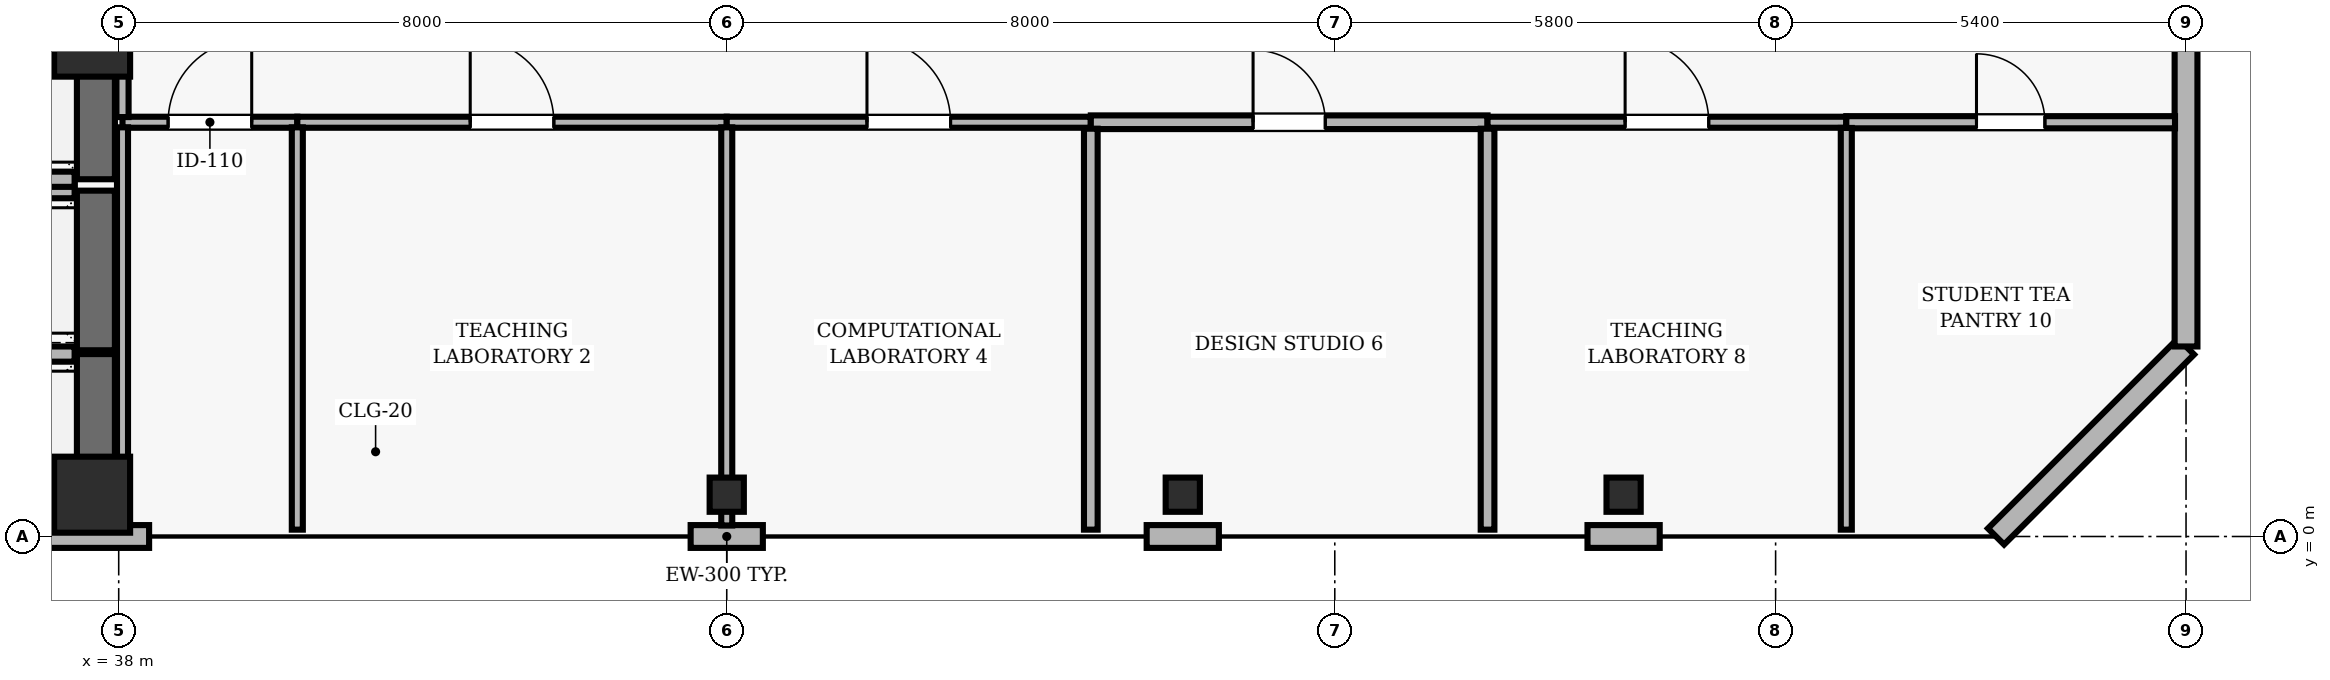
"""IFC4 building model, lengths in metres.
Left out: names, types, materials, properties, quantities, classifications, styles, units other than length and angle.
Written with IfcOpenShell. Run it as: python <this file> out.ifc"""

import sys

from ifc_helpers import new_model, si_unit, direction, frame, frame_2d, origin, origin_2d, place, context, subcontext, project, spatial, rectangle, hollow_rectangle, extrude, element, fill, save


model = new_model("IFC4")
c1 = context("Model", 3, precision=1e-05, world=origin(), true_north=direction((0.0, 1.0)))
c2 = subcontext(c1, "Body", "Model", "MODEL_VIEW")
j1 = project(units=[si_unit("LENGTHUNIT", "METRE"), si_unit("PLANEANGLEUNIT", "RADIAN")], contexts=[c1])
p1 = place(None, origin())
s1 = spatial("IfcSite", under=j1, at=p1, CompositionType="ELEMENT")
p2 = place(p1, origin())
s2 = spatial("IfcBuilding", under=s1, at=p2, CompositionType="ELEMENT")
p3 = place(p2, frame((0.0, 0.0, 207.0)))
s3 = spatial("IfcBuildingStorey", under=s2, at=p3, CompositionType="ELEMENT", Elevation=207.0)
for number, where, z_axis, x_axis in (
    (1, (37.65, 0.55, 0.0), (0.0, 0.0, 1.0), (1.0, 0.0, 0.0)),
    (2, (37.65, 6.55, 0.0), (0.0, 0.0, 1.0), (1.0, 0.0, 0.0)),
):
    element("IfcColumn", number, at=place(p3, frame(where, z_axis=z_axis, x_axis=x_axis)), inside=s3, PredefinedType="COLUMN", context=c2, shape_type="SweptSolid", body=[
        extrude(rectangle(XDim=1.0, YDim=1.0, at=origin_2d()), origin(), (0.0, 0.0, 1.0), 3.9),
    ])
for number, where, z_axis, x_axis in (
    (3, (46.0, 0.55, 0.0), (0.0, 0.0, 1.0), (1.0, 0.0, 0.0)),
    (4, (52.0, 0.55, 0.0), (0.0, 0.0, 1.0), (1.0, 0.0, 0.0)),
    (5, (57.8, 0.55, 0.0), (0.0, 0.0, 1.0), (1.0, 0.0, 0.0)),
):
    element("IfcColumn", number, at=place(p3, frame(where, z_axis=z_axis, x_axis=x_axis)), inside=s3, PredefinedType="COLUMN", context=c2, shape_type="SweptSolid", body=[
        extrude(hollow_rectangle(XDim=0.45, YDim=0.45, WallThickness=0.02, at=origin_2d()), origin(), (0.0, 0.0, 1.0), 3.9),
    ])
p4 = place(p3, frame((31.0, 0.0, 0.0), z_axis=(0.0, 0.0, 1.0), x_axis=(1.0, 0.0, 0.0)))
e6 = element("IfcWall", 6, at=p4, inside=s3, PredefinedType="SOLIDWALL", context=c2, shape_type="SweptSolid", body=[
    extrude(rectangle(XDim=7.4, YDim=0.3, at=frame_2d((3.7, 0.0))), origin(), (0.0, 0.0, 1.0), 3.69),
])
for number, where, z_axis, x_axis in (
    (7, (45.525, 0.0, 0.0), (0.0, 0.0, 1.0), (1.0, 0.0, 0.0)),
    (8, (51.525, 0.0, 0.0), (0.0, 0.0, 1.0), (1.0, 0.0, 0.0)),
):
    element("IfcWall", number, at=place(p3, frame(where, z_axis=z_axis, x_axis=x_axis)), inside=s3, PredefinedType="SOLIDWALL", context=c2, shape_type="SweptSolid", body=[
        extrude(rectangle(XDim=0.95, YDim=0.3, at=frame_2d((0.475, 0.0))), origin(), (0.0, 0.0, 1.0), 3.69),
    ])
p5 = place(p3, frame((57.325, 0.0, 0.0), z_axis=(0.0, 0.0, 1.0), x_axis=(1.0, 0.0, 0.0)))
e9 = element("IfcWall", 9, at=p5, inside=s3, PredefinedType="SOLIDWALL", context=c2, shape_type="SweptSolid", body=[
    extrude(rectangle(XDim=0.95, YDim=0.3, at=frame_2d((0.475, 0.0))), origin(), (0.0, 0.0, 1.0), 3.69),
])
p6 = place(p3, frame((62.7, 0.0, 0.0), z_axis=(0.0, 0.0, 1.0), x_axis=(0.707106781187, 0.707106781187, 0.0)))
e10 = element("IfcWall", 10, at=p6, inside=s3, PredefinedType="SOLIDWALL", context=c2, shape_type="SweptSolid", body=[
    extrude(rectangle(XDim=3.536, YDim=0.3, at=frame_2d((1.768, 0.0))), origin(), (0.0, 0.0, 1.0), 3.69),
])
p7 = place(p3, frame((65.2, 2.5, 0.0), z_axis=(0.0, 0.0, 1.0), x_axis=(0.0, 1.0, 0.0)))
e11 = element("IfcWall", 11, at=p7, inside=s3, PredefinedType="SOLIDWALL", context=c2, shape_type="SweptSolid", body=[
    extrude(rectangle(XDim=11.0, YDim=0.3, at=frame_2d((5.5, 0.0))), origin(), (0.0, 0.0, 1.0), 3.69),
])
p8 = place(p7, frame((7.05, 0.0, 0.9)))
e12 = element("IfcOpeningElement", 12, at=p8, cuts=e11, PredefinedType="OPENING", context=c2, shape_type="SweptSolid", body=[
    extrude(rectangle(XDim=2.4, YDim=1.6, at=frame_2d((1.2, 0.8))), frame((0.0, 0.16, 0.0), z_axis=(0.0, -1.0, 0.0), x_axis=(1.0, 0.0, 0.0)), (0.0, 0.0, 1.0), 0.32),
])
p9 = place(p3, frame((37.7, 0.3, 0.0), z_axis=(0.0, 0.0, 1.0), x_axis=(0.0, 1.0, 0.0)))
e13 = element("IfcWall", 13, at=p9, inside=s3, PredefinedType="SHEAR", context=c2, shape_type="SweptSolid", body=[
    extrude(rectangle(XDim=2.1, YDim=0.5, at=frame_2d((1.05, 0.0))), origin(), (0.0, 0.0, 1.0), 3.69),
])
for number, where, z_axis, x_axis in (
    (14, (35.28, 0.3, 0.0), (0.0, 0.0, 1.0), (1.0, 0.0, 0.0)),
    (15, (37.42, 2.4, 0.0), (0.0, 0.0, 1.0), (-1.0, 0.0, 0.0)),
):
    element("IfcWall", number, at=place(p3, frame(where, z_axis=z_axis, x_axis=x_axis)), inside=s3, PredefinedType="SOLIDWALL", context=c2, shape_type="SweptSolid", body=[
        extrude(rectangle(XDim=2.14, YDim=0.2, at=frame_2d((1.07, 0.0))), origin(), (0.0, 0.0, 1.0), 3.69),
    ])
p10 = place(p3, frame((37.7, 2.45, 0.0), z_axis=(0.0, 0.0, 1.0), x_axis=(0.0, 1.0, 0.0)))
e16 = element("IfcWall", 16, at=p10, inside=s3, PredefinedType="SHEAR", context=c2, shape_type="SweptSolid", body=[
    extrude(rectangle(XDim=2.1, YDim=0.5, at=frame_2d((1.05, 0.0))), origin(), (0.0, 0.0, 1.0), 3.69),
])
p11 = place(p3, frame((37.42, 4.55, 0.0), z_axis=(0.0, 0.0, 1.0), x_axis=(-1.0, 0.0, 0.0)))
e17 = element("IfcWall", 17, at=p11, inside=s3, PredefinedType="SOLIDWALL", context=c2, shape_type="SweptSolid", body=[
    extrude(rectangle(XDim=2.14, YDim=0.2, at=frame_2d((1.07, 0.0))), origin(), (0.0, 0.0, 1.0), 3.69),
])
p12 = place(p3, frame((37.7, 4.7, 0.0), z_axis=(0.0, 0.0, 1.0), x_axis=(0.0, 1.0, 0.0)))
e18 = element("IfcWall", 18, at=p12, inside=s3, PredefinedType="SHEAR", context=c2, shape_type="SweptSolid", body=[
    extrude(rectangle(XDim=2.25, YDim=0.5, at=frame_2d((1.125, 0.0))), origin(), (0.0, 0.0, 1.0), 3.69),
])
p13 = place(p3, frame((35.28, 4.7, 0.0), z_axis=(0.0, 0.0, 1.0), x_axis=(1.0, 0.0, 0.0)))
e19 = element("IfcWall", 19, at=p13, inside=s3, PredefinedType="SOLIDWALL", context=c2, shape_type="SweptSolid", body=[
    extrude(rectangle(XDim=2.14, YDim=0.2, at=frame_2d((1.07, 0.0))), origin(), (0.0, 0.0, 1.0), 3.69),
])
p14 = place(p3, frame((38.05, 5.45, 0.0), z_axis=(0.0, 0.0, 1.0), x_axis=(1.0, 0.0, 0.0)))
e20 = element("IfcWall", 20, at=p14, inside=s3, PredefinedType="PARTITIONING", context=c2, shape_type="SweptSolid", body=[
    extrude(rectangle(XDim=2.3, YDim=0.145, at=frame_2d((1.15, 0.0))), origin(), (0.0, 0.0, 1.0), 3.343),
])
p15 = place(p14, frame((0.6, 0.0, 0.0)))
e21 = element("IfcOpeningElement", 21, at=p15, cuts=e20, PredefinedType="OPENING", context=c2, shape_type="SweptSolid", body=[
    extrude(rectangle(XDim=1.1, YDim=2.15, at=frame_2d((0.55, 1.075))), frame((0.0, 0.083, 0.0), z_axis=(0.0, -1.0, 0.0), x_axis=(1.0, 0.0, 0.0)), (0.0, 0.0, 1.0), 0.165),
])
p16 = place(p3, frame((40.35, 5.45, 0.0), z_axis=(0.0, 0.0, 1.0), x_axis=(1.0, 0.0, 0.0)))
e22 = element("IfcWall", 22, at=p16, inside=s3, PredefinedType="PARTITIONING", context=c2, shape_type="SweptSolid", body=[
    extrude(rectangle(XDim=5.65, YDim=0.145, at=frame_2d((2.825, 0.0))), origin(), (0.0, 0.0, 1.0), 3.343),
])
p17 = place(p16, frame((2.275, 0.0, 0.0)))
e23 = element("IfcOpeningElement", 23, at=p17, cuts=e22, PredefinedType="OPENING", context=c2, shape_type="SweptSolid", body=[
    extrude(rectangle(XDim=1.1, YDim=2.15, at=frame_2d((0.55, 1.075))), frame((0.0, 0.083, 0.0), z_axis=(0.0, -1.0, 0.0), x_axis=(1.0, 0.0, 0.0)), (0.0, 0.0, 1.0), 0.165),
])
p18 = place(p3, frame((46.0, 5.45, 0.0), z_axis=(0.0, 0.0, 1.0), x_axis=(1.0, 0.0, 0.0)))
e24 = element("IfcWall", 24, at=p18, inside=s3, PredefinedType="PARTITIONING", context=c2, shape_type="SweptSolid", body=[
    extrude(rectangle(XDim=4.79, YDim=0.145, at=frame_2d((2.395, 0.0))), origin(), (0.0, 0.0, 1.0), 3.343),
])
p19 = place(p18, frame((1.845, 0.0, 0.0)))
e25 = element("IfcOpeningElement", 25, at=p19, cuts=e24, PredefinedType="OPENING", context=c2, shape_type="SweptSolid", body=[
    extrude(rectangle(XDim=1.1, YDim=2.15, at=frame_2d((0.55, 1.075))), frame((0.0, 0.083, 0.0), z_axis=(0.0, -1.0, 0.0), x_axis=(1.0, 0.0, 0.0)), (0.0, 0.0, 1.0), 0.165),
])
p20 = place(p3, frame((50.79, 5.45, 0.0), z_axis=(0.0, 0.0, 1.0), x_axis=(1.0, 0.0, 0.0)))
e26 = element("IfcWall", 26, at=p20, inside=s3, PredefinedType="PARTITIONING", context=c2, shape_type="SweptSolid", body=[
    extrude(rectangle(XDim=5.22, YDim=0.18, at=frame_2d((2.61, 0.0))), origin(), (0.0, 0.0, 1.0), 3.343),
])
p21 = place(p20, frame((2.135, 0.0, 0.0)))
e27 = element("IfcOpeningElement", 27, at=p21, cuts=e26, PredefinedType="OPENING", context=c2, shape_type="SweptSolid", body=[
    extrude(rectangle(XDim=0.95, YDim=2.1, at=frame_2d((0.475, 1.05))), frame((0.0, 0.1, 0.0), z_axis=(0.0, -1.0, 0.0), x_axis=(1.0, 0.0, 0.0)), (0.0, 0.0, 1.0), 0.2),
])
p22 = place(p3, frame((56.01, 5.45, 0.0), z_axis=(0.0, 0.0, 1.0), x_axis=(1.0, 0.0, 0.0)))
e28 = element("IfcWall", 28, at=p22, inside=s3, PredefinedType="PARTITIONING", context=c2, shape_type="SweptSolid", body=[
    extrude(rectangle(XDim=4.72, YDim=0.145, at=frame_2d((2.36, 0.0))), origin(), (0.0, 0.0, 1.0), 3.343),
])
p23 = place(p22, frame((1.81, 0.0, 0.0)))
e29 = element("IfcOpeningElement", 29, at=p23, cuts=e28, PredefinedType="OPENING", context=c2, shape_type="SweptSolid", body=[
    extrude(rectangle(XDim=1.1, YDim=2.15, at=frame_2d((0.55, 1.075))), frame((0.0, 0.083, 0.0), z_axis=(0.0, -1.0, 0.0), x_axis=(1.0, 0.0, 0.0)), (0.0, 0.0, 1.0), 0.165),
])
p24 = place(p3, frame((60.73, 5.45, 0.0), z_axis=(0.0, 0.0, 1.0), x_axis=(1.0, 0.0, 0.0)))
e30 = element("IfcWall", 30, at=p24, inside=s3, PredefinedType="PARTITIONING", context=c2, shape_type="SweptSolid", body=[
    extrude(rectangle(XDim=4.325, YDim=0.16, at=frame_2d((2.163, 0.0))), origin(), (0.0, 0.0, 1.0), 3.69),
])
p25 = place(p24, frame((1.713, 0.0, 0.0)))
e31 = element("IfcOpeningElement", 31, at=p25, cuts=e30, PredefinedType="OPENING", context=c2, shape_type="SweptSolid", body=[
    extrude(rectangle(XDim=0.9, YDim=2.1, at=frame_2d((0.45, 1.05))), frame((0.0, 0.09, 0.0), z_axis=(0.0, -1.0, 0.0), x_axis=(1.0, 0.0, 0.0)), (0.0, 0.0, 1.0), 0.18),
])
p26 = place(p3, frame((38.05, 5.383, 0.0), z_axis=(0.0, 0.0, 1.0), x_axis=(0.0, -1.0, 0.0)))
e32 = element("IfcWall", 32, at=p26, inside=s3, PredefinedType="PARTITIONING", context=c2, shape_type="SweptSolid", body=[
    extrude(rectangle(XDim=5.238, YDim=0.145, at=frame_2d((2.619, 0.0))), origin(), (0.0, 0.0, 1.0), 3.139),
])
p27 = place(p3, frame((38.05, 7.05, 0.0), z_axis=(0.0, 0.0, 1.0), x_axis=(0.0, -1.0, 0.0)))
e33 = element("IfcWall", 33, at=p27, inside=s3, PredefinedType="PARTITIONING", context=c2, shape_type="SweptSolid", body=[
    extrude(rectangle(XDim=1.532, YDim=0.16, at=frame_2d((0.766, 0.0))), origin(), (0.0, 0.0, 1.0), 3.139),
])
p28 = place(p3, frame((40.35, 0.09, 0.0), z_axis=(0.0, 0.0, 1.0), x_axis=(0.0, 1.0, 0.0)))
e34 = element("IfcWall", 34, at=p28, inside=s3, PredefinedType="PARTITIONING", context=c2, shape_type="SweptSolid", body=[
    extrude(rectangle(XDim=5.293, YDim=0.145, at=frame_2d((2.646, 0.0))), origin(), (0.0, 0.0, 1.0), 3.69),
])
p29 = place(p3, frame((46.0, 0.145, 0.0), z_axis=(0.0, 0.0, 1.0), x_axis=(0.0, 1.0, 0.0)))
e35 = element("IfcWall", 35, at=p29, inside=s3, PredefinedType="PARTITIONING", context=c2, shape_type="SweptSolid", body=[
    extrude(rectangle(XDim=5.238, YDim=0.145, at=frame_2d((2.619, 0.0))), origin(), (0.0, 0.0, 1.0), 3.139),
])
for number, where, z_axis, x_axis in (
    (36, (50.79, 0.09, 0.0), (0.0, 0.0, 1.0), (0.0, 1.0, 0.0)),
    (37, (56.01, 0.09, 0.0), (0.0, 0.0, 1.0), (0.0, 1.0, 0.0)),
):
    element("IfcWall", number, at=place(p3, frame(where, z_axis=z_axis, x_axis=x_axis)), inside=s3, PredefinedType="PARTITIONING", context=c2, shape_type="SweptSolid", body=[
        extrude(rectangle(XDim=5.275, YDim=0.18, at=frame_2d((2.637, 0.0))), origin(), (0.0, 0.0, 1.0), 3.69),
    ])
p30 = place(p3, frame((60.73, 0.09, 0.0), z_axis=(0.0, 0.0, 1.0), x_axis=(0.0, 1.0, 0.0)))
e38 = element("IfcWall", 38, at=p30, inside=s3, PredefinedType="PARTITIONING", context=c2, shape_type="SweptSolid", body=[
    extrude(rectangle(XDim=5.285, YDim=0.145, at=frame_2d((2.643, 0.0))), origin(), (0.0, 0.0, 1.0), 3.69),
])
p31 = place(p15, origin())
e39 = element("IfcDoor", 39, at=p31, inside=s3, OperationType="SINGLE_SWING_RIGHT", PredefinedType="DOOR", context=c2, shape_type="SweptSolid", body=[
    extrude(rectangle(XDim=1.1, YDim=2.15, at=frame_2d((0.55, 1.075))), frame((0.0, 0.025, 0.0), z_axis=(0.0, -1.0, 0.0), x_axis=(1.0, 0.0, 0.0)), (0.0, 0.0, 1.0), 0.05),
])
fill(e21, e39)
p32 = place(p17, origin())
e40 = element("IfcDoor", 40, at=p32, inside=s3, OperationType="SINGLE_SWING_LEFT", PredefinedType="DOOR", context=c2, shape_type="SweptSolid", body=[
    extrude(rectangle(XDim=1.1, YDim=2.15, at=frame_2d((0.55, 1.075))), frame((0.0, 0.025, 0.0), z_axis=(0.0, -1.0, 0.0), x_axis=(1.0, 0.0, 0.0)), (0.0, 0.0, 1.0), 0.05),
])
fill(e23, e40)
p33 = place(p19, origin())
e41 = element("IfcDoor", 41, at=p33, inside=s3, OperationType="SINGLE_SWING_LEFT", PredefinedType="DOOR", context=c2, shape_type="SweptSolid", body=[
    extrude(rectangle(XDim=1.1, YDim=2.15, at=frame_2d((0.55, 1.075))), frame((0.0, 0.025, 0.0), z_axis=(0.0, -1.0, 0.0), x_axis=(1.0, 0.0, 0.0)), (0.0, 0.0, 1.0), 0.05),
])
fill(e25, e41)
p34 = place(p21, origin())
e42 = element("IfcDoor", 42, at=p34, inside=s3, OperationType="SINGLE_SWING_LEFT", PredefinedType="DOOR", context=c2, shape_type="SweptSolid", body=[
    extrude(rectangle(XDim=0.95, YDim=2.1, at=frame_2d((0.475, 1.05))), frame((0.0, 0.025, 0.0), z_axis=(0.0, -1.0, 0.0), x_axis=(1.0, 0.0, 0.0)), (0.0, 0.0, 1.0), 0.05),
])
fill(e27, e42)
p35 = place(p23, origin())
e43 = element("IfcDoor", 43, at=p35, inside=s3, OperationType="SINGLE_SWING_LEFT", PredefinedType="DOOR", context=c2, shape_type="SweptSolid", body=[
    extrude(rectangle(XDim=1.1, YDim=2.15, at=frame_2d((0.55, 1.075))), frame((0.0, 0.025, 0.0), z_axis=(0.0, -1.0, 0.0), x_axis=(1.0, 0.0, 0.0)), (0.0, 0.0, 1.0), 0.05),
])
fill(e29, e43)
p36 = place(p25, origin())
e44 = element("IfcDoor", 44, at=p36, inside=s3, OperationType="SINGLE_SWING_LEFT", PredefinedType="DOOR", context=c2, shape_type="SweptSolid", body=[
    extrude(rectangle(XDim=0.9, YDim=2.1, at=frame_2d((0.45, 1.05))), frame((0.0, 0.025, 0.0), z_axis=(0.0, -1.0, 0.0), x_axis=(1.0, 0.0, 0.0)), (0.0, 0.0, 1.0), 0.05),
])
fill(e31, e44)
save(model, sys.argv[1])
